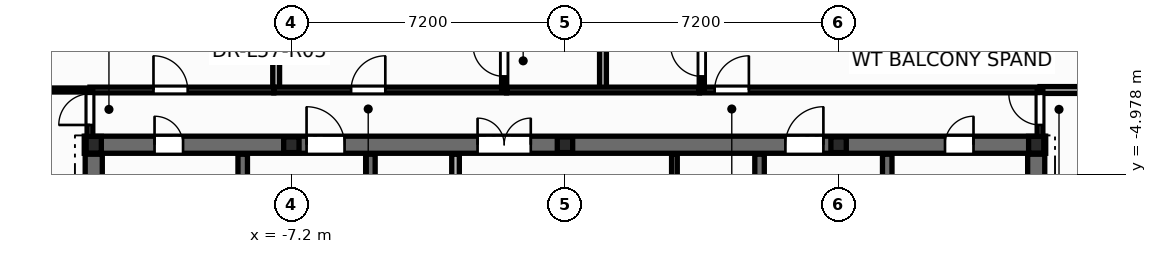
"""IFC4 building model, lengths in metres.
Left out: names, types, materials, properties, quantities, classifications, styles, units other than length and angle.
Written with IfcOpenShell. Run it as: python <this file> out.ifc"""

import sys

from ifc_helpers import new_model, si_unit, direction, frame, frame_2d, origin, origin_2d, place, context, subcontext, project, spatial, rectangle, i_section, extrude, element, fill, save


model = new_model("IFC4")
c1 = context("Model", 3, precision=1e-05, world=origin(), true_north=direction((0.0, 1.0)))
c2 = subcontext(c1, "Body", "Model", "MODEL_VIEW")
j1 = project(units=[si_unit("LENGTHUNIT", "METRE"), si_unit("PLANEANGLEUNIT", "RADIAN")], contexts=[c1])
p1 = place(None, origin())
s1 = spatial("IfcSite", under=j1, at=p1, CompositionType="ELEMENT")
p2 = place(p1, origin())
s2 = spatial("IfcBuilding", under=s1, at=p2, CompositionType="ELEMENT")
p3 = place(p2, frame((0.0, 0.0, 218.1)))
s3 = spatial("IfcBuildingStorey", under=s2, at=p3, CompositionType="ELEMENT", Elevation=218.1)
for number, where, z_axis, x_axis in (
    (1, (12.4, -4.2, 0.0), (0.0, 0.0, 1.0), (1.0, 0.0, 0.0)),
    (2, (-12.4, -4.2, 0.0), (0.0, 0.0, 1.0), (1.0, 0.0, 0.0)),
):
    element("IfcColumn", number, at=place(p3, frame(where, z_axis=z_axis, x_axis=x_axis)), inside=s3, PredefinedType="COLUMN", context=c2, shape_type="SweptSolid", body=[
        extrude(i_section(OverallWidth=0.4, OverallDepth=0.44, WebThickness=0.028, FlangeThickness=0.04, at=origin_2d()), origin(), (0.0, 0.0, 1.0), 3.6),
    ])
for number, where, z_axis, x_axis in (
    (3, (-7.2, -4.2, 0.0), (0.0, 0.0, 1.0), (1.0, 0.0, 0.0)),
    (4, (0.0, -4.2, 0.0), (0.0, 0.0, 1.0), (1.0, 0.0, 0.0)),
    (5, (7.2, -4.2, 0.0), (0.0, 0.0, 1.0), (1.0, 0.0, 0.0)),
):
    element("IfcColumn", number, at=place(p3, frame(where, z_axis=z_axis, x_axis=x_axis)), inside=s3, PredefinedType="PILASTER", context=c2, shape_type="SweptSolid", body=[
        extrude(i_section(OverallWidth=0.405, OverallDepth=0.414, WebThickness=0.022, FlangeThickness=0.032, at=origin_2d()), origin(), (0.0, 0.0, 1.0), 3.6),
    ])
p4 = place(p3, frame((2.88, -5.6, 0.0), z_axis=(0.0, 0.0, 1.0), x_axis=(0.0, 1.0, 0.0)))
e6 = element("IfcWall", 6, at=p4, inside=s3, PredefinedType="PARTITIONING", context=c2, shape_type="SweptSolid", body=[
    extrude(rectangle(XDim=1.15, YDim=0.15, at=frame_2d((0.575, 0.0))), origin(), (0.0, 0.0, 1.0), 3.345),
])
p5 = place(p3, frame((-12.65, -4.2, 0.0), z_axis=(0.0, 0.0, 1.0), x_axis=(1.0, 0.0, 0.0)))
e7 = element("IfcWall", 7, at=p5, inside=s3, PredefinedType="SHEAR", context=c2, shape_type="SweptSolid", body=[
    extrude(rectangle(XDim=25.3, YDim=0.45, at=frame_2d((12.65, 0.0))), origin(), (0.0, 0.0, 1.0), 3.6),
])
p6 = place(p5, frame((1.85, 0.0, 0.0)))
e8 = element("IfcOpeningElement", 8, at=p6, cuts=e7, PredefinedType="OPENING", context=c2, shape_type="SweptSolid", body=[
    extrude(rectangle(XDim=0.756, YDim=2.054, at=frame_2d((0.375, 1.027))), frame((0.0, 0.235, 0.0), z_axis=(0.0, -1.0, 0.0), x_axis=(1.0, 0.0, 0.0)), (0.0, 0.0, 1.0), 0.47),
])
p7 = place(p5, frame((22.65, 0.0, 0.0)))
e9 = element("IfcOpeningElement", 9, at=p7, cuts=e7, PredefinedType="OPENING", context=c2, shape_type="SweptSolid", body=[
    extrude(rectangle(XDim=0.756, YDim=2.054, at=frame_2d((0.375, 1.027))), frame((0.0, 0.235, 0.0), z_axis=(0.0, -1.0, 0.0), x_axis=(1.0, 0.0, 0.0)), (0.0, 0.0, 1.0), 0.47),
])
p8 = place(p5, frame((5.85, 0.0, 0.0)))
e10 = element("IfcOpeningElement", 10, at=p8, cuts=e7, PredefinedType="OPENING", context=c2, shape_type="SweptSolid", body=[
    extrude(rectangle(XDim=1.006, YDim=2.104, at=frame_2d((0.5, 1.052))), frame((0.0, 0.235, 0.0), z_axis=(0.0, -1.0, 0.0), x_axis=(1.0, 0.0, 0.0)), (0.0, 0.0, 1.0), 0.47),
])
p9 = place(p5, frame((10.35, 0.0, 0.0)))
e11 = element("IfcOpeningElement", 11, at=p9, cuts=e7, PredefinedType="OPENING", context=c2, shape_type="SweptSolid", body=[
    extrude(rectangle(XDim=1.406, YDim=2.154, at=frame_2d((0.7, 1.077))), frame((0.0, 0.235, 0.0), z_axis=(0.0, -1.0, 0.0), x_axis=(1.0, 0.0, 0.0)), (0.0, 0.0, 1.0), 0.47),
])
p10 = place(p5, frame((18.45, 0.0, 0.0)))
e12 = element("IfcOpeningElement", 12, at=p10, cuts=e7, PredefinedType="OPENING", context=c2, shape_type="SweptSolid", body=[
    extrude(rectangle(XDim=1.006, YDim=2.104, at=frame_2d((0.5, 1.052))), frame((0.0, 0.235, 0.0), z_axis=(0.0, -1.0, 0.0), x_axis=(1.0, 0.0, 0.0)), (0.0, 0.0, 1.0), 0.47),
])
p11 = place(p3, frame((-8.48, -13.85, 0.0), z_axis=(0.0, 0.0, 1.0), x_axis=(0.0, 1.0, 0.0)))
e13 = element("IfcWall", 13, at=p11, inside=s3, PredefinedType="SHEAR", context=c2, shape_type="SweptSolid", body=[
    extrude(rectangle(XDim=9.4, YDim=0.25, at=frame_2d((4.7, 0.0))), origin(), (0.0, 0.0, 1.0), 3.6),
])
p12 = place(p11, frame((6.95, 0.0, 0.0)))
e14 = element("IfcOpeningElement", 14, at=p12, cuts=e13, PredefinedType="OPENING", context=c2, shape_type="SweptSolid", body=[
    extrude(rectangle(XDim=1.006, YDim=2.104, at=frame_2d((0.5, 1.052))), frame((0.0, 0.135, 0.0), z_axis=(0.0, -1.0, 0.0), x_axis=(1.0, 0.0, 0.0)), (0.0, 0.0, 1.0), 0.27),
])
p13 = place(p3, frame((8.48, -13.85, 0.0), z_axis=(0.0, 0.0, 1.0), x_axis=(0.0, 1.0, 0.0)))
e15 = element("IfcWall", 15, at=p13, inside=s3, PredefinedType="SHEAR", context=c2, shape_type="SweptSolid", body=[
    extrude(rectangle(XDim=9.4, YDim=0.25, at=frame_2d((4.7, 0.0))), origin(), (0.0, 0.0, 1.0), 3.6),
])
p14 = place(p13, frame((6.95, 0.0, 0.0)))
e16 = element("IfcOpeningElement", 16, at=p14, cuts=e15, PredefinedType="OPENING", context=c2, shape_type="SweptSolid", body=[
    extrude(rectangle(XDim=1.006, YDim=2.104, at=frame_2d((0.5, 1.052))), frame((0.0, 0.135, 0.0), z_axis=(0.0, -1.0, 0.0), x_axis=(1.0, 0.0, 0.0)), (0.0, 0.0, 1.0), 0.27),
])
for number, where, z_axis, x_axis in (
    (17, (-5.12, -13.85, 0.0), (0.0, 0.0, 1.0), (0.0, 1.0, 0.0)),
    (18, (5.12, -13.85, 0.0), (0.0, 0.0, 1.0), (0.0, 1.0, 0.0)),
):
    element("IfcWall", number, at=place(p3, frame(where, z_axis=z_axis, x_axis=x_axis)), inside=s3, PredefinedType="SHEAR", context=c2, shape_type="SweptSolid", body=[
        extrude(rectangle(XDim=9.4, YDim=0.25, at=frame_2d((4.7, 0.0))), origin(), (0.0, 0.0, 1.0), 3.6),
    ])
for number, where, z_axis, x_axis in (
    (19, (-12.4, -13.85, 0.0), (0.0, 0.0, 1.0), (0.0, 1.0, 0.0)),
    (20, (12.4, -13.85, 0.0), (0.0, 0.0, 1.0), (0.0, 1.0, 0.0)),
):
    element("IfcWall", number, at=place(p3, frame(where, z_axis=z_axis, x_axis=x_axis)), inside=s3, PredefinedType="SHEAR", context=c2, shape_type="SweptSolid", body=[
        extrude(rectangle(XDim=9.4, YDim=0.45, at=frame_2d((4.7, 0.0))), origin(), (0.0, 0.0, 1.0), 3.6),
    ])
p15 = place(p3, frame((-2.88, -9.45, 0.0), z_axis=(0.0, 0.0, 1.0), x_axis=(0.0, 1.0, 0.0)))
e21 = element("IfcWall", 21, at=p15, inside=s3, PredefinedType="SOLIDWALL", context=c2, shape_type="SweptSolid", body=[
    extrude(rectangle(XDim=5.0, YDim=0.2, at=frame_2d((2.5, 0.0))), origin(), (0.0, 0.0, 1.0), 3.345),
])
p16 = place(p15, frame((2.05, 0.0, 0.0)))
e22 = element("IfcOpeningElement", 22, at=p16, cuts=e21, PredefinedType="OPENING", context=c2, shape_type="SweptSolid", body=[
    extrude(rectangle(XDim=0.926, YDim=2.104, at=frame_2d((0.46, 1.052))), frame((0.0, 0.11, 0.0), z_axis=(0.0, -1.0, 0.0), x_axis=(1.0, 0.0, 0.0)), (0.0, 0.0, 1.0), 0.22),
])
p17 = place(p3, frame((3.54, -2.76, 0.0), z_axis=(0.0, 0.0, 1.0), x_axis=(1.0, 0.0, 0.0)))
e23 = element("IfcWall", 23, at=p17, inside=s3, PredefinedType="PARTITIONING", context=c2, shape_type="SweptSolid", body=[
    extrude(rectangle(XDim=8.96, YDim=0.15, at=frame_2d((4.48, 0.0))), origin(), (0.0, 0.0, 1.0), 2.32),
])
p18 = place(p17, frame((0.399, 0.0, 0.0)))
e24 = element("IfcOpeningElement", 24, at=p18, cuts=e23, PredefinedType="OPENING", context=c2, shape_type="SweptSolid", body=[
    extrude(rectangle(XDim=0.906, YDim=2.104, at=frame_2d((0.45, 1.052))), frame((0.0, 0.085, 0.0), z_axis=(0.0, -1.0, 0.0), x_axis=(1.0, 0.0, 0.0)), (0.0, 0.0, 1.0), 0.17),
])
p19 = place(p3, frame((-7.6, -2.76, 0.0), z_axis=(0.0, 0.0, 1.0), x_axis=(0.0, 1.0, 0.0)))
e25 = element("IfcWall", 25, at=p19, inside=s3, PredefinedType="PARTITIONING", context=c2, shape_type="SweptSolid", body=[
    extrude(rectangle(XDim=9.972, YDim=0.18, at=frame_2d((4.986, 0.0))), origin(), (0.0, 0.0, 1.0), 2.62),
])
p20 = place(p3, frame((-7.66, -2.76, 0.0), z_axis=(0.0, 0.0, 1.0), x_axis=(1.0, 0.0, 0.0)))
e26 = element("IfcWall", 26, at=p20, inside=s3, PredefinedType="PARTITIONING", context=c2, shape_type="SweptSolid", body=[
    extrude(rectangle(XDim=6.12, YDim=0.15, at=frame_2d((3.06, 0.0))), origin(), (0.0, 0.0, 1.0), 2.32),
])
p21 = place(p20, frame((2.032, 0.0, 0.0)))
e27 = element("IfcOpeningElement", 27, at=p21, cuts=e26, PredefinedType="OPENING", context=c2, shape_type="SweptSolid", body=[
    extrude(rectangle(XDim=0.906, YDim=2.104, at=frame_2d((0.45, 1.052))), frame((0.0, 0.085, 0.0), z_axis=(0.0, -1.0, 0.0), x_axis=(1.0, 0.0, 0.0)), (0.0, 0.0, 1.0), 0.17),
])
p22 = place(p3, frame((-12.5, -2.76, 0.0), z_axis=(0.0, 0.0, 1.0), x_axis=(1.0, 0.0, 0.0)))
e28 = element("IfcWall", 28, at=p22, inside=s3, PredefinedType="PARTITIONING", context=c2, shape_type="SweptSolid", body=[
    extrude(rectangle(XDim=4.838, YDim=0.15, at=frame_2d((2.419, 0.0))), origin(), (0.0, 0.0, 1.0), 3.345),
])
p23 = place(p22, frame((1.672, 0.0, 0.0)))
e29 = element("IfcOpeningElement", 29, at=p23, cuts=e28, PredefinedType="OPENING", context=c2, shape_type="SweptSolid", body=[
    extrude(rectangle(XDim=0.906, YDim=2.104, at=frame_2d((0.45, 1.052))), frame((0.0, 0.085, 0.0), z_axis=(0.0, -1.0, 0.0), x_axis=(1.0, 0.0, 0.0)), (0.0, 0.0, 1.0), 0.17),
])
p24 = place(p3, frame((1.0, -2.76, 0.0), z_axis=(0.0, 0.0, 1.0), x_axis=(0.0, 1.0, 0.0)))
e30 = element("IfcWall", 30, at=p24, inside=s3, PredefinedType="PARTITIONING", context=c2, shape_type="SweptSolid", body=[
    extrude(rectangle(XDim=16.313, YDim=0.18, at=frame_2d((8.156, 0.0))), origin(), (0.0, 0.0, 1.0), 2.32),
])
p25 = place(p3, frame((-1.6, -2.76, 0.0), z_axis=(0.0, 0.0, 1.0), x_axis=(0.0, 1.0, 0.0)))
e31 = element("IfcWall", 31, at=p25, inside=s3, PredefinedType="PARTITIONING", context=c2, shape_type="SweptSolid", body=[
    extrude(rectangle(XDim=2.92, YDim=0.135, at=frame_2d((1.46, 0.0))), origin(), (0.0, 0.0, 1.0), 3.345),
])
p26 = place(p25, frame((0.357, 0.0, 0.0)))
e32 = element("IfcOpeningElement", 32, at=p26, cuts=e31, PredefinedType="OPENING", context=c2, shape_type="SweptSolid", body=[
    extrude(rectangle(XDim=0.826, YDim=2.104, at=frame_2d((0.41, 1.052))), frame((0.0, 0.078, 0.0), z_axis=(0.0, -1.0, 0.0), x_axis=(1.0, 0.0, 0.0)), (0.0, 0.0, 1.0), 0.155),
])
p27 = place(p3, frame((3.6, -2.76, 0.0), z_axis=(0.0, 0.0, 1.0), x_axis=(0.0, 1.0, 0.0)))
e33 = element("IfcWall", 33, at=p27, inside=s3, PredefinedType="PARTITIONING", context=c2, shape_type="SweptSolid", body=[
    extrude(rectangle(XDim=2.92, YDim=0.135, at=frame_2d((1.46, 0.0))), origin(), (0.0, 0.0, 1.0), 2.964),
])
p28 = place(p27, frame((0.357, 0.0, 0.0)))
e34 = element("IfcOpeningElement", 34, at=p28, cuts=e33, PredefinedType="OPENING", context=c2, shape_type="SweptSolid", body=[
    extrude(rectangle(XDim=0.826, YDim=2.104, at=frame_2d((0.41, 1.052))), frame((0.0, 0.078, 0.0), z_axis=(0.0, -1.0, 0.0), x_axis=(1.0, 0.0, 0.0)), (0.0, 0.0, 1.0), 0.155),
])
p29 = place(p3, frame((-1.538, -2.76, 0.0), z_axis=(0.0, 0.0, 1.0), x_axis=(1.0, 0.0, 0.0)))
e35 = element("IfcWall", 35, at=p29, inside=s3, PredefinedType="PARTITIONING", context=c2, shape_type="SweptSolid", body=[
    extrude(rectangle(XDim=5.076, YDim=0.15, at=frame_2d((2.538, 0.0))), origin(), (0.0, 0.0, 1.0), 2.32),
])
p30 = place(p3, frame((-14.757, -2.76, 0.0), z_axis=(0.0, 0.0, 1.0), x_axis=(1.0, 0.0, 0.0)))
e36 = element("IfcWall", 36, at=p30, inside=s3, PredefinedType="PARTITIONING", context=c2, shape_type="SweptSolid", body=[
    extrude(rectangle(XDim=2.257, YDim=0.105, at=frame_2d((1.129, 0.0))), origin(), (0.0, 0.0, 1.0), 2.62),
])
p31 = place(p3, frame((12.5, -2.76, 0.0), z_axis=(0.0, 0.0, 1.0), x_axis=(1.0, 0.0, 0.0)))
e37 = element("IfcWall", 37, at=p31, inside=s3, PredefinedType="PARTITIONING", context=c2, shape_type="SweptSolid", body=[
    extrude(rectangle(XDim=2.257, YDim=0.18, at=frame_2d((1.129, 0.0))), origin(), (0.0, 0.0, 1.0), 2.62),
])
p32 = place(p3, frame((-12.5, -4.24, 0.0), z_axis=(0.0, 0.0, 1.0), x_axis=(0.0, 1.0, 0.0)))
e38 = element("IfcWall", 38, at=p32, inside=s3, PredefinedType="PARTITIONING", context=c2, shape_type="SweptSolid", body=[
    extrude(rectangle(XDim=1.48, YDim=0.15, at=frame_2d((0.74, 0.0))), origin(), (0.0, 0.0, 1.0), 2.32),
])
p33 = place(p32, frame((0.56, 0.0, 0.0)))
e39 = element("IfcOpeningElement", 39, at=p33, cuts=e38, PredefinedType="OPENING", context=c2, shape_type="SweptSolid", body=[
    extrude(rectangle(XDim=0.826, YDim=2.104, at=frame_2d((0.41, 1.052))), frame((0.0, 0.085, 0.0), z_axis=(0.0, -1.0, 0.0), x_axis=(1.0, 0.0, 0.0)), (0.0, 0.0, 1.0), 0.17),
])
p34 = place(p3, frame((12.5, -4.24, 0.0), z_axis=(0.0, 0.0, 1.0), x_axis=(0.0, 1.0, 0.0)))
e40 = element("IfcWall", 40, at=p34, inside=s3, PredefinedType="PARTITIONING", context=c2, shape_type="SweptSolid", body=[
    extrude(rectangle(XDim=1.48, YDim=0.15, at=frame_2d((0.74, 0.0))), origin(), (0.0, 0.0, 1.0), 2.32),
])
p35 = place(p34, frame((0.56, 0.0, 0.0)))
e41 = element("IfcOpeningElement", 41, at=p35, cuts=e40, PredefinedType="OPENING", context=c2, shape_type="SweptSolid", body=[
    extrude(rectangle(XDim=0.826, YDim=2.104, at=frame_2d((0.41, 1.052))), frame((0.0, 0.085, 0.0), z_axis=(0.0, -1.0, 0.0), x_axis=(1.0, 0.0, 0.0)), (0.0, 0.0, 1.0), 0.17),
])
p36 = place(p6, origin())
e42 = element("IfcDoor", 42, at=p36, inside=s3, OperationType="SINGLE_SWING_LEFT", PredefinedType="DOOR", context=c2, shape_type="SweptSolid", body=[
    extrude(rectangle(XDim=0.75, YDim=2.05, at=frame_2d((0.375, 1.025))), frame((0.0, 0.025, 0.0), z_axis=(0.0, -1.0, 0.0), x_axis=(1.0, 0.0, 0.0)), (0.0, 0.0, 1.0), 0.05),
])
fill(e8, e42)
p37 = place(p7, origin())
e43 = element("IfcDoor", 43, at=p37, inside=s3, OperationType="SINGLE_SWING_RIGHT", PredefinedType="DOOR", context=c2, shape_type="SweptSolid", body=[
    extrude(rectangle(XDim=0.75, YDim=2.05, at=frame_2d((0.375, 1.025))), frame((0.0, 0.025, 0.0), z_axis=(0.0, -1.0, 0.0), x_axis=(1.0, 0.0, 0.0)), (0.0, 0.0, 1.0), 0.05),
])
fill(e9, e43)
p38 = place(p8, origin())
e44 = element("IfcDoor", 44, at=p38, inside=s3, OperationType="SINGLE_SWING_LEFT", PredefinedType="DOOR", context=c2, shape_type="SweptSolid", body=[
    extrude(rectangle(XDim=1.0, YDim=2.1, at=frame_2d((0.5, 1.05))), frame((0.0, 0.025, 0.0), z_axis=(0.0, -1.0, 0.0), x_axis=(1.0, 0.0, 0.0)), (0.0, 0.0, 1.0), 0.05),
])
fill(e10, e44)
p39 = place(p9, origin())
e45 = element("IfcDoor", 45, at=p39, inside=s3, OperationType="DOUBLE_DOOR_SINGLE_SWING", PredefinedType="DOOR", context=c2, shape_type="SweptSolid", body=[
    extrude(rectangle(XDim=1.4, YDim=2.15, at=frame_2d((0.7, 1.075))), frame((0.0, 0.025, 0.0), z_axis=(0.0, -1.0, 0.0), x_axis=(1.0, 0.0, 0.0)), (0.0, 0.0, 1.0), 0.05),
])
fill(e11, e45)
p40 = place(p10, origin())
e46 = element("IfcDoor", 46, at=p40, inside=s3, OperationType="SINGLE_SWING_RIGHT", PredefinedType="DOOR", context=c2, shape_type="SweptSolid", body=[
    extrude(rectangle(XDim=1.0, YDim=2.1, at=frame_2d((0.5, 1.05))), frame((0.0, 0.025, 0.0), z_axis=(0.0, -1.0, 0.0), x_axis=(1.0, 0.0, 0.0)), (0.0, 0.0, 1.0), 0.05),
])
fill(e12, e46)
p41 = place(p33, origin())
e47 = element("IfcDoor", 47, at=p41, inside=s3, OperationType="SINGLE_SWING_LEFT", PredefinedType="DOOR", context=c2, shape_type="SweptSolid", body=[
    extrude(rectangle(XDim=0.82, YDim=2.1, at=frame_2d((0.41, 1.05))), frame((0.0, 0.025, 0.0), z_axis=(0.0, -1.0, 0.0), x_axis=(1.0, 0.0, 0.0)), (0.0, 0.0, 1.0), 0.05),
])
fill(e39, e47)
p42 = place(p35, origin())
e48 = element("IfcDoor", 48, at=p42, inside=s3, OperationType="SINGLE_SWING_RIGHT", PredefinedType="DOOR", context=c2, shape_type="SweptSolid", body=[
    extrude(rectangle(XDim=0.82, YDim=2.1, at=frame_2d((0.41, 1.05))), frame((0.0, 0.025, 0.0), z_axis=(0.0, -1.0, 0.0), x_axis=(1.0, 0.0, 0.0)), (0.0, 0.0, 1.0), 0.05),
])
fill(e41, e48)
p43 = place(p23, origin())
e49 = element("IfcDoor", 49, at=p43, inside=s3, OperationType="SINGLE_SWING_LEFT", PredefinedType="DOOR", context=c2, shape_type="SweptSolid", body=[
    extrude(rectangle(XDim=0.9, YDim=2.1, at=frame_2d((0.45, 1.05))), frame((0.0, 0.025, 0.0), z_axis=(0.0, -1.0, 0.0), x_axis=(1.0, 0.0, 0.0)), (0.0, 0.0, 1.0), 0.05),
])
fill(e29, e49)
p44 = place(p26, origin())
e50 = element("IfcDoor", 50, at=p44, inside=s3, OperationType="SINGLE_SWING_RIGHT", PredefinedType="DOOR", context=c2, shape_type="SweptSolid", body=[
    extrude(rectangle(XDim=0.82, YDim=2.1, at=frame_2d((0.41, 1.05))), frame((0.0, 0.025, 0.0), z_axis=(0.0, -1.0, 0.0), x_axis=(1.0, 0.0, 0.0)), (0.0, 0.0, 1.0), 0.05),
])
fill(e32, e50)
p45 = place(p21, origin())
e51 = element("IfcDoor", 51, at=p45, inside=s3, OperationType="SINGLE_SWING_RIGHT", PredefinedType="DOOR", context=c2, shape_type="SweptSolid", body=[
    extrude(rectangle(XDim=0.9, YDim=2.1, at=frame_2d((0.45, 1.05))), frame((0.0, 0.025, 0.0), z_axis=(0.0, -1.0, 0.0), x_axis=(1.0, 0.0, 0.0)), (0.0, 0.0, 1.0), 0.05),
])
fill(e27, e51)
p46 = place(p28, origin())
e52 = element("IfcDoor", 52, at=p46, inside=s3, OperationType="SINGLE_SWING_RIGHT", PredefinedType="DOOR", context=c2, shape_type="SweptSolid", body=[
    extrude(rectangle(XDim=0.82, YDim=2.1, at=frame_2d((0.41, 1.05))), frame((0.0, 0.025, 0.0), z_axis=(0.0, -1.0, 0.0), x_axis=(1.0, 0.0, 0.0)), (0.0, 0.0, 1.0), 0.05),
])
fill(e34, e52)
p47 = place(p18, origin())
e53 = element("IfcDoor", 53, at=p47, inside=s3, OperationType="SINGLE_SWING_RIGHT", PredefinedType="DOOR", context=c2, shape_type="SweptSolid", body=[
    extrude(rectangle(XDim=0.9, YDim=2.1, at=frame_2d((0.45, 1.05))), frame((0.0, 0.025, 0.0), z_axis=(0.0, -1.0, 0.0), x_axis=(1.0, 0.0, 0.0)), (0.0, 0.0, 1.0), 0.05),
])
fill(e24, e53)
save(model, sys.argv[1])
